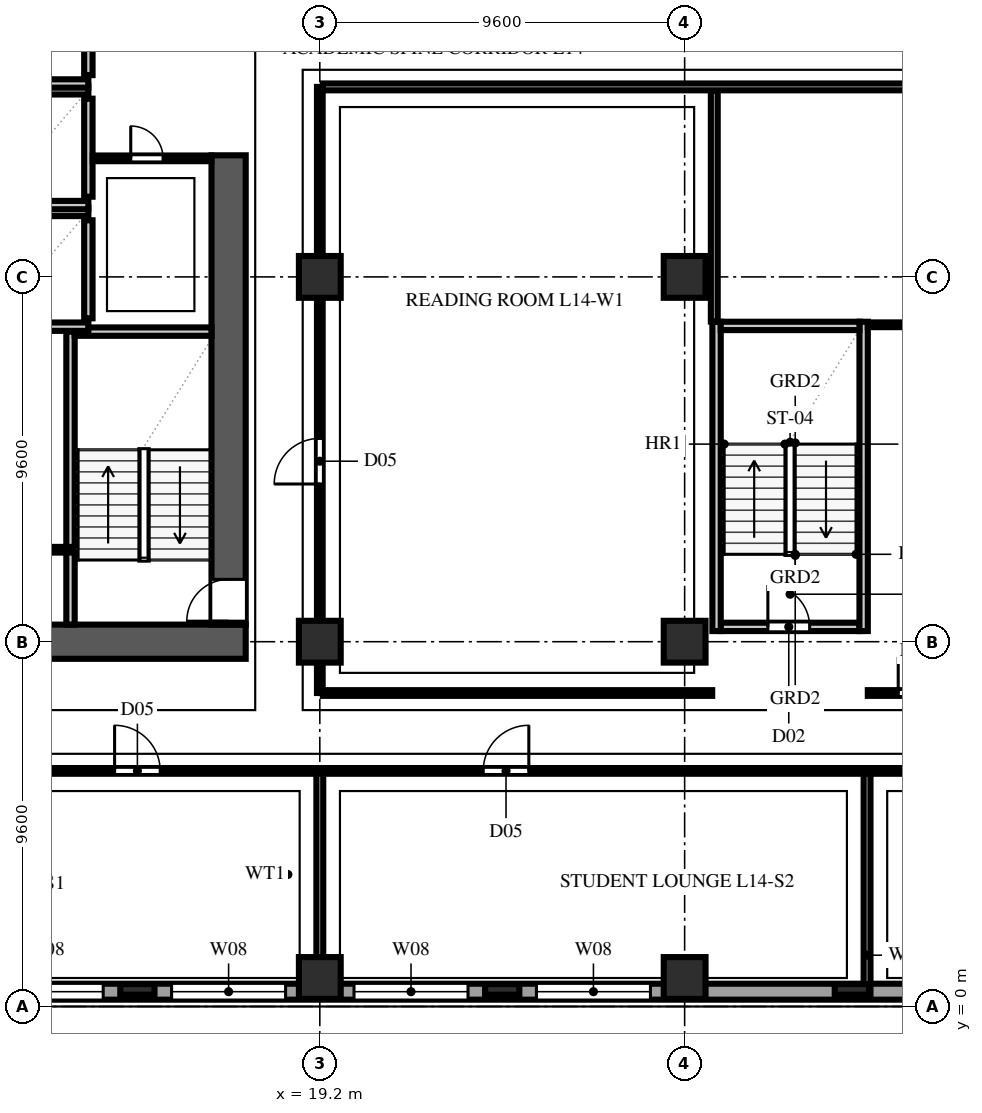
"""IFC4 building model, lengths in metres.
Left out: names, types, materials, properties, quantities, classifications, styles, units other than length and angle.
Written with IfcOpenShell. Run it as: python <this file> out.ifc"""

import sys

from ifc_helpers import new_model, si_unit, direction, frame, frame_2d, origin, origin_2d, place, context, subcontext, project, spatial, rectangle, extrude, element, fill, save


model = new_model("IFC4")
c1 = context("Model", 3, precision=1e-05, world=origin(), true_north=direction((0.0, 1.0)))
c2 = subcontext(c1, "Body", "Model", "MODEL_VIEW")
j1 = project(units=[si_unit("LENGTHUNIT", "METRE"), si_unit("PLANEANGLEUNIT", "RADIAN")], contexts=[c1])
p1 = place(None, origin())
s1 = spatial("IfcSite", under=j1, at=p1, CompositionType="ELEMENT")
p2 = place(p1, origin())
s2 = spatial("IfcBuilding", under=s1, at=p2, CompositionType="ELEMENT")
p3 = place(p2, frame((0.0, 0.0, 58.4)))
s3 = spatial("IfcBuildingStorey", under=s2, at=p3, CompositionType="ELEMENT", Elevation=58.4)
p4 = place(p3, frame((2.65, 9.6, 0.0), z_axis=(0.0, 0.0, 1.0), x_axis=(1.0, 0.0, 0.0)))
e1 = element("IfcWall", 1, at=p4, inside=s3, PredefinedType="SHEAR", context=c2, shape_type="SweptSolid", body=[
    extrude(rectangle(XDim=14.6, YDim=0.9, at=frame_2d((7.3, 0.0))), origin(), (0.0, 0.0, 1.0), 3.54),
])
p5 = place(p3, frame((16.8, 10.05, 0.0), z_axis=(0.0, 0.0, 1.0), x_axis=(0.0, 1.0, 0.0)))
e2 = element("IfcWall", 2, at=p5, inside=s3, PredefinedType="SHEAR", context=c2, shape_type="SweptSolid", body=[
    extrude(rectangle(XDim=12.35, YDim=0.9, at=frame_2d((6.175, 0.0))), origin(), (0.0, 0.0, 1.0), 3.54),
])
p6 = place(p5, frame((0.09, 0.0, 0.0)))
e3 = element("IfcOpeningElement", 3, at=p6, cuts=e2, PredefinedType="OPENING", context=c2, shape_type="SweptSolid", body=[
    extrude(rectangle(XDim=1.1, YDim=2.2, at=frame_2d((0.55, 1.1))), frame((0.0, 0.462, 0.0), z_axis=(0.0, -1.0, 0.0), x_axis=(1.0, 0.0, 0.0)), (0.0, 0.0, 1.0), 0.924),
])
for number, where, z_axis, x_axis in (
    (4, (19.2, 0.75, 0.0), (0.0, 0.0, 1.0), (1.0, 0.0, 0.0)),
    (5, (19.2, 9.6, 0.0), (0.0, 0.0, 1.0), (1.0, 0.0, 0.0)),
    (6, (19.2, 19.2, 0.0), (0.0, 0.0, 1.0), (1.0, 0.0, 0.0)),
    (7, (28.8, 0.75, 0.0), (0.0, 0.0, 1.0), (1.0, 0.0, 0.0)),
    (8, (28.8, 9.6, 0.0), (0.0, 0.0, 1.0), (1.0, 0.0, 0.0)),
    (9, (28.8, 19.2, 0.0), (0.0, 0.0, 1.0), (1.0, 0.0, 0.0)),
):
    element("IfcColumn", number, at=place(p3, frame(where, z_axis=z_axis, x_axis=x_axis)), inside=s3, PredefinedType="COLUMN", context=c2, shape_type="SweptSolid", body=[
        extrude(rectangle(XDim=1.1, YDim=1.1, at=origin_2d()), origin(), (0.0, 0.0, 1.0), 3.8),
    ])
for number, where, z_axis, x_axis in (
    (10, (14.4, 0.45, 0.0), (0.0, 0.0, 1.0), (1.0, 0.0, 0.0)),
    (11, (24.0, 0.45, 0.0), (0.0, 0.0, 1.0), (1.0, 0.0, 0.0)),
    (12, (33.2, 0.45, 0.0), (0.0, 0.0, 1.0), (1.0, 0.0, 0.0)),
):
    element("IfcColumn", number, at=place(p3, frame(where, z_axis=z_axis, x_axis=x_axis)), inside=s3, PredefinedType="PILASTER", context=c2, shape_type="SweptSolid", body=[
        extrude(rectangle(XDim=0.9, YDim=0.28, at=origin_2d()), origin(), (0.0, 0.0, 1.0), 3.8),
    ])
p7 = place(p3, frame((1.84, 0.39, 0.0), z_axis=(0.0, 0.0, 1.0), x_axis=(1.0, 0.0, 0.0)))
e13 = element("IfcWall", 13, at=p7, inside=s3, PredefinedType="SOLIDWALL", context=c2, shape_type="SweptSolid", body=[
    extrude(rectangle(XDim=63.52, YDim=0.42, at=frame_2d((31.76, 0.0))), origin(), (0.0, 0.0, 1.0), 3.54),
])
p8 = place(p7, frame((3.86, 0.0, 0.75)))
e14 = element("IfcOpeningElement", 14, at=p8, cuts=e13, PredefinedType="OPENING", context=c2, shape_type="SweptSolid", body=[
    extrude(rectangle(XDim=3.0, YDim=1.9, at=frame_2d((1.5, 0.95))), frame((0.0, 0.222, 0.0), z_axis=(0.0, -1.0, 0.0), x_axis=(1.0, 0.0, 0.0)), (0.0, 0.0, 1.0), 0.444),
])
p9 = place(p7, frame((8.66, 0.0, 0.75)))
e15 = element("IfcOpeningElement", 15, at=p9, cuts=e13, PredefinedType="OPENING", context=c2, shape_type="SweptSolid", body=[
    extrude(rectangle(XDim=3.0, YDim=1.9, at=frame_2d((1.5, 0.95))), frame((0.0, 0.222, 0.0), z_axis=(0.0, -1.0, 0.0), x_axis=(1.0, 0.0, 0.0)), (0.0, 0.0, 1.0), 0.444),
])
p10 = place(p7, frame((13.46, 0.0, 0.75)))
e16 = element("IfcOpeningElement", 16, at=p10, cuts=e13, PredefinedType="OPENING", context=c2, shape_type="SweptSolid", body=[
    extrude(rectangle(XDim=3.0, YDim=1.9, at=frame_2d((1.5, 0.95))), frame((0.0, 0.222, 0.0), z_axis=(0.0, -1.0, 0.0), x_axis=(1.0, 0.0, 0.0)), (0.0, 0.0, 1.0), 0.444),
])
p11 = place(p7, frame((18.26, 0.0, 0.75)))
e17 = element("IfcOpeningElement", 17, at=p11, cuts=e13, PredefinedType="OPENING", context=c2, shape_type="SweptSolid", body=[
    extrude(rectangle(XDim=3.0, YDim=1.9, at=frame_2d((1.5, 0.95))), frame((0.0, 0.222, 0.0), z_axis=(0.0, -1.0, 0.0), x_axis=(1.0, 0.0, 0.0)), (0.0, 0.0, 1.0), 0.444),
])
p12 = place(p7, frame((23.06, 0.0, 0.75)))
e18 = element("IfcOpeningElement", 18, at=p12, cuts=e13, PredefinedType="OPENING", context=c2, shape_type="SweptSolid", body=[
    extrude(rectangle(XDim=3.0, YDim=1.9, at=frame_2d((1.5, 0.95))), frame((0.0, 0.222, 0.0), z_axis=(0.0, -1.0, 0.0), x_axis=(1.0, 0.0, 0.0)), (0.0, 0.0, 1.0), 0.444),
])
p13 = place(p3, frame((12.64, 10.05, 0.0), z_axis=(0.0, 0.0, 1.0), x_axis=(0.0, 1.0, 0.0)))
e19 = element("IfcWall", 19, at=p13, inside=s3, PredefinedType="SOLIDWALL", context=c2, shape_type="SweptSolid", body=[
    extrude(rectangle(XDim=7.71, YDim=0.22, at=frame_2d((3.855, 0.0))), origin(), (0.0, 0.0, 1.0), 3.54),
])
p14 = place(p3, frame((12.75, 17.76, 0.0), z_axis=(0.0, 0.0, 1.0), x_axis=(1.0, 0.0, 0.0)))
e20 = element("IfcWall", 20, at=p14, inside=s3, PredefinedType="SOLIDWALL", context=c2, shape_type="SweptSolid", body=[
    extrude(rectangle(XDim=3.6, YDim=0.22, at=frame_2d((1.8, 0.0))), origin(), (0.0, 0.0, 1.0), 3.54),
])
p15 = place(p3, frame((29.75, 9.99, 0.0), z_axis=(0.0, 0.0, 1.0), x_axis=(1.0, 0.0, 0.0)))
e21 = element("IfcWall", 21, at=p15, inside=s3, PredefinedType="SOLIDWALL", context=c2, shape_type="SweptSolid", body=[
    extrude(rectangle(XDim=3.65, YDim=0.22, at=frame_2d((1.825, 0.0))), origin(), (0.0, 0.0, 1.0), 3.54),
])
p16 = place(p15, frame((1.24, 0.0, 0.0)))
e22 = element("IfcOpeningElement", 22, at=p16, cuts=e21, PredefinedType="OPENING", context=c2, shape_type="SweptSolid", body=[
    extrude(rectangle(XDim=1.1, YDim=2.2, at=frame_2d((0.55, 1.1))), frame((0.0, 0.122, 0.0), z_axis=(0.0, -1.0, 0.0), x_axis=(1.0, 0.0, 0.0)), (0.0, 0.0, 1.0), 0.244),
])
for number, where, z_axis, x_axis in (
    (23, (29.64, 9.88, 0.0), (0.0, 0.0, 1.0), (0.0, 1.0, 0.0)),
    (24, (33.51, 9.88, 0.0), (0.0, 0.0, 1.0), (0.0, 1.0, 0.0)),
):
    element("IfcWall", number, at=place(p3, frame(where, z_axis=z_axis, x_axis=x_axis)), inside=s3, PredefinedType="SOLIDWALL", context=c2, shape_type="SweptSolid", body=[
        extrude(rectangle(XDim=8.14, YDim=0.22, at=frame_2d((4.07, 0.0))), origin(), (0.0, 0.0, 1.0), 3.54),
    ])
p17 = place(p3, frame((29.75, 17.91, 0.0), z_axis=(0.0, 0.0, 1.0), x_axis=(1.0, 0.0, 0.0)))
e25 = element("IfcWall", 25, at=p17, inside=s3, PredefinedType="SOLIDWALL", context=c2, shape_type="SweptSolid", body=[
    extrude(rectangle(XDim=3.65, YDim=0.22, at=frame_2d((1.825, 0.0))), origin(), (0.0, 0.0, 1.0), 3.54),
])
p18 = place(p3, frame((13.11, 18.11, 0.0), z_axis=(0.0, 0.0, 1.0), x_axis=(0.0, 1.0, 0.0)))
e26 = element("IfcWall", 26, at=p18, inside=s3, PredefinedType="SOLIDWALL", context=c2, shape_type="SweptSolid", body=[
    extrude(rectangle(XDim=2.58, YDim=0.22, at=frame_2d((1.29, 0.0))), origin(), (0.0, 0.0, 1.0), 3.54),
])
for number, where, z_axis, x_axis in (
    (27, (10.49, 17.89, 0.0), (0.0, 0.0, 1.0), (1.0, 0.0, 0.0)),
    (28, (10.49, 20.91, 0.0), (0.0, 0.0, 1.0), (1.0, 0.0, 0.0)),
):
    element("IfcWall", number, at=place(p3, frame(where, z_axis=z_axis, x_axis=x_axis)), inside=s3, PredefinedType="SOLIDWALL", context=c2, shape_type="SweptSolid", body=[
        extrude(rectangle(XDim=2.62, YDim=0.22, at=frame_2d((1.31, 0.0))), origin(), (0.0, 0.0, 1.0), 3.54),
    ])
p19 = place(p3, frame((13.11, 21.31, 0.0), z_axis=(0.0, 0.0, 1.0), x_axis=(0.0, 1.0, 0.0)))
e29 = element("IfcWall", 29, at=p19, inside=s3, PredefinedType="SOLIDWALL", context=c2, shape_type="SweptSolid", body=[
    extrude(rectangle(XDim=2.58, YDim=0.22, at=frame_2d((1.29, 0.0))), origin(), (0.0, 0.0, 1.0), 3.54),
])
for number, where, z_axis, x_axis in (
    (30, (10.49, 21.09, 0.0), (0.0, 0.0, 1.0), (1.0, 0.0, 0.0)),
    (31, (10.49, 24.11, 0.0), (0.0, 0.0, 1.0), (1.0, 0.0, 0.0)),
):
    element("IfcWall", number, at=place(p3, frame(where, z_axis=z_axis, x_axis=x_axis)), inside=s3, PredefinedType="SOLIDWALL", context=c2, shape_type="SweptSolid", body=[
        extrude(rectangle(XDim=2.62, YDim=0.22, at=frame_2d((1.31, 0.0))), origin(), (0.0, 0.0, 1.0), 3.54),
    ])
p20 = place(p3, frame((13.11, 24.51, 0.0), z_axis=(0.0, 0.0, 1.0), x_axis=(0.0, 1.0, 0.0)))
e32 = element("IfcWall", 32, at=p20, inside=s3, PredefinedType="SOLIDWALL", context=c2, shape_type="SweptSolid", body=[
    extrude(rectangle(XDim=2.58, YDim=0.22, at=frame_2d((1.29, 0.0))), origin(), (0.0, 0.0, 1.0), 3.54),
])
p21 = place(p3, frame((10.49, 24.29, 0.0), z_axis=(0.0, 0.0, 1.0), x_axis=(1.0, 0.0, 0.0)))
e33 = element("IfcWall", 33, at=p21, inside=s3, PredefinedType="SOLIDWALL", context=c2, shape_type="SweptSolid", body=[
    extrude(rectangle(XDim=2.62, YDim=0.22, at=frame_2d((1.31, 0.0))), origin(), (0.0, 0.0, 1.0), 3.54),
])
p22 = place(p3, frame((10.55, 12.02, 0.0), z_axis=(0.0, 0.0, 1.0), x_axis=(1.0, 0.0, 0.0)))
e34 = element("IfcWall", 34, at=p22, inside=s3, PredefinedType="PARTITIONING", context=c2, shape_type="SweptSolid", body=[
    extrude(rectangle(XDim=2.08, YDim=0.15, at=frame_2d((1.04, 0.0))), origin(), (0.0, 0.0, 1.0), 3.54),
])
p23 = place(p22, frame((0.5, 0.0, 0.0)))
e35 = element("IfcOpeningElement", 35, at=p23, cuts=e34, PredefinedType="OPENING", context=c2, shape_type="SweptSolid", body=[
    extrude(rectangle(XDim=0.85, YDim=2.1, at=frame_2d((0.425, 1.05))), frame((0.0, 0.087, 0.0), z_axis=(0.0, -1.0, 0.0), x_axis=(1.0, 0.0, 0.0)), (0.0, 0.0, 1.0), 0.174),
])
p24 = place(p3, frame((13.225, 22.32, 0.0), z_axis=(0.0, 0.0, 1.0), x_axis=(1.0, 0.0, 0.0)))
e36 = element("IfcWall", 36, at=p24, inside=s3, PredefinedType="PARTITIONING", context=c2, shape_type="SweptSolid", body=[
    extrude(rectangle(XDim=3.12, YDim=0.15, at=frame_2d((1.56, 0.0))), origin(), (0.0, 0.0, 1.0), 3.54),
])
p25 = place(p24, frame((1.0, 0.0, 0.0)))
e37 = element("IfcOpeningElement", 37, at=p25, cuts=e36, PredefinedType="OPENING", context=c2, shape_type="SweptSolid", body=[
    extrude(rectangle(XDim=0.85, YDim=2.1, at=frame_2d((0.425, 1.05))), frame((0.0, 0.087, 0.0), z_axis=(0.0, -1.0, 0.0), x_axis=(1.0, 0.0, 0.0)), (0.0, 0.0, 1.0), 0.174),
])
p26 = place(p3, frame((19.2, 0.22, 0.0), z_axis=(0.0, 0.0, 1.0), x_axis=(0.0, 1.0, 0.0)))
e38 = element("IfcWall", 38, at=p26, inside=s3, PredefinedType="PARTITIONING", context=c2, shape_type="SweptSolid", body=[
    extrude(rectangle(XDim=0.53, YDim=0.18, at=frame_2d((0.265, 0.0))), origin(), (0.0, 0.0, 1.0), 3.54),
])
p27 = place(p3, frame((19.2, 0.75, 0.0), z_axis=(0.0, 0.0, 1.0), x_axis=(0.0, 1.0, 0.0)))
e39 = element("IfcWall", 39, at=p27, inside=s3, PredefinedType="PARTITIONING", context=c2, shape_type="SweptSolid", body=[
    extrude(rectangle(XDim=5.45, YDim=0.18, at=frame_2d((2.725, 0.0))), origin(), (0.0, 0.0, 1.0), 2.845),
])
p28 = place(p3, frame((33.6, 0.22, 0.0), z_axis=(0.0, 0.0, 1.0), x_axis=(0.0, 1.0, 0.0)))
e40 = element("IfcWall", 40, at=p28, inside=s3, PredefinedType="PARTITIONING", context=c2, shape_type="SweptSolid", body=[
    extrude(rectangle(XDim=5.98, YDim=0.18, at=frame_2d((2.99, 0.0))), origin(), (0.0, 0.0, 1.0), 3.54),
])
p29 = place(p3, frame((0.22, 6.2, 0.0), z_axis=(0.0, 0.0, 1.0), x_axis=(1.0, 0.0, 0.0)))
e41 = element("IfcWall", 41, at=p29, inside=s3, PredefinedType="PARTITIONING", context=c2, shape_type="SweptSolid", body=[
    extrude(rectangle(XDim=52.58, YDim=0.15, at=frame_2d((26.29, 0.0))), origin(), (0.0, 0.0, 1.0), 3.54),
])
p30 = place(p29, frame((13.58, 0.0, 0.0)))
e42 = element("IfcOpeningElement", 42, at=p30, cuts=e41, PredefinedType="OPENING", context=c2, shape_type="SweptSolid", body=[
    extrude(rectangle(XDim=1.2, YDim=2.2, at=frame_2d((0.6, 1.1))), frame((0.0, 0.087, 0.0), z_axis=(0.0, -1.0, 0.0), x_axis=(1.0, 0.0, 0.0)), (0.0, 0.0, 1.0), 0.174),
])
p31 = place(p29, frame((23.28, 0.0, 0.0)))
e43 = element("IfcOpeningElement", 43, at=p31, cuts=e41, PredefinedType="OPENING", context=c2, shape_type="SweptSolid", body=[
    extrude(rectangle(XDim=1.2, YDim=2.2, at=frame_2d((0.6, 1.1))), frame((0.0, 0.087, 0.0), z_axis=(0.0, -1.0, 0.0), x_axis=(1.0, 0.0, 0.0)), (0.0, 0.0, 1.0), 0.174),
])
p32 = place(p29, frame((41.18, 0.0, 0.0)))
e44 = element("IfcOpeningElement", 44, at=p32, cuts=e41, PredefinedType="OPENING", context=c2, shape_type="SweptSolid", body=[
    extrude(rectangle(XDim=2.0, YDim=2.3, at=frame_2d((1.0, 1.15))), frame((0.0, 0.087, 0.0), z_axis=(0.0, -1.0, 0.0), x_axis=(1.0, 0.0, 0.0)), (0.0, 0.0, 1.0), 0.174),
])
p33 = place(p3, frame((19.2, 8.25, 0.0), z_axis=(0.0, 0.0, 1.0), x_axis=(0.0, 1.0, 0.0)))
e45 = element("IfcWall", 45, at=p33, inside=s3, PredefinedType="PARTITIONING", context=c2, shape_type="SweptSolid", body=[
    extrude(rectangle(XDim=15.95, YDim=0.15, at=frame_2d((7.975, 0.0))), origin(), (0.0, 0.0, 1.0), 2.845),
])
p34 = place(p33, frame((5.5, 0.0, 0.0)))
e46 = element("IfcOpeningElement", 46, at=p34, cuts=e45, PredefinedType="OPENING", context=c2, shape_type="SweptSolid", body=[
    extrude(rectangle(XDim=1.2, YDim=2.2, at=frame_2d((0.6, 1.1))), frame((0.0, 0.087, 0.0), z_axis=(0.0, -1.0, 0.0), x_axis=(1.0, 0.0, 0.0)), (0.0, 0.0, 1.0), 0.174),
])
p35 = place(p3, frame((29.58, 18.025, 0.0), z_axis=(0.0, 0.0, 1.0), x_axis=(0.0, 1.0, 0.0)))
e47 = element("IfcWall", 47, at=p35, inside=s3, PredefinedType="PARTITIONING", context=c2, shape_type="SweptSolid", body=[
    extrude(rectangle(XDim=6.08, YDim=0.18, at=frame_2d((3.04, 0.0))), origin(), (0.0, 0.0, 1.0), 3.54),
])
p36 = place(p3, frame((19.28, 24.2, 0.0), z_axis=(0.0, 0.0, 1.0), x_axis=(1.0, 0.0, 0.0)))
e48 = element("IfcWall", 48, at=p36, inside=s3, PredefinedType="PARTITIONING", context=c2, shape_type="SweptSolid", body=[
    extrude(rectangle(XDim=31.47, YDim=0.18, at=frame_2d((15.735, 0.0))), origin(), (0.0, 0.0, 1.0), 3.54),
])
p37 = place(p36, frame((22.67, 0.0, 0.0)))
e49 = element("IfcOpeningElement", 49, at=p37, cuts=e48, PredefinedType="OPENING", context=c2, shape_type="SweptSolid", body=[
    extrude(rectangle(XDim=0.95, YDim=2.15, at=frame_2d((0.475, 1.075))), frame((0.0, 0.102, 0.0), z_axis=(0.0, -1.0, 0.0), x_axis=(1.0, 0.0, 0.0)), (0.0, 0.0, 1.0), 0.204),
])
p38 = place(p3, frame((19.28, 8.25, 0.0), z_axis=(0.0, 0.0, 1.0), x_axis=(1.0, 0.0, 0.0)))
e50 = element("IfcWall", 50, at=p38, inside=s3, PredefinedType="PARTITIONING", context=c2, shape_type="SweptSolid", body=[
    extrude(rectangle(XDim=10.245, YDim=0.15, at=frame_2d((5.123, 0.0))), origin(), (0.0, 0.0, 1.0), 3.54),
])
p39 = place(p3, frame((33.62, 17.94, 0.0), z_axis=(0.0, 0.0, 1.0), x_axis=(1.0, 0.0, 0.0)))
e51 = element("IfcWall", 51, at=p39, inside=s3, PredefinedType="PARTITIONING", context=c2, shape_type="SweptSolid", body=[
    extrude(rectangle(XDim=17.13, YDim=0.125, at=frame_2d((8.565, 0.0))), origin(), (0.0, 0.0, 1.0), 3.54),
])
p40 = place(p3, frame((33.62, 8.25, 0.0), z_axis=(0.0, 0.0, 1.0), x_axis=(1.0, 0.0, 0.0)))
e52 = element("IfcWall", 52, at=p40, inside=s3, PredefinedType="PARTITIONING", context=c2, shape_type="SweptSolid", body=[
    extrude(rectangle(XDim=17.13, YDim=0.15, at=frame_2d((8.565, 0.0))), origin(), (0.0, 0.0, 1.0), 3.54),
])
p41 = place(p40, frame((0.8, 0.0, 0.0)))
e53 = element("IfcOpeningElement", 53, at=p41, cuts=e52, PredefinedType="OPENING", context=c2, shape_type="SweptSolid", body=[
    extrude(rectangle(XDim=0.95, YDim=2.15, at=frame_2d((0.475, 1.075))), frame((0.0, 0.087, 0.0), z_axis=(0.0, -1.0, 0.0), x_axis=(1.0, 0.0, 0.0)), (0.0, 0.0, 1.0), 0.174),
])
p42 = place(p9, origin())
e54 = element("IfcWindow", 54, at=p42, inside=s3, PartitioningType="TRIPLE_PANEL_VERTICAL", PredefinedType="WINDOW", context=c2, shape_type="SweptSolid", body=[
    extrude(rectangle(XDim=3.0, YDim=1.9, at=frame_2d((1.5, 0.95))), frame((0.0, 0.11, 0.0), z_axis=(0.0, -1.0, 0.0), x_axis=(1.0, 0.0, 0.0)), (0.0, 0.0, 1.0), 0.06),
])
fill(e15, e54)
p43 = place(p10, origin())
e55 = element("IfcWindow", 55, at=p43, inside=s3, PartitioningType="TRIPLE_PANEL_VERTICAL", PredefinedType="WINDOW", context=c2, shape_type="SweptSolid", body=[
    extrude(rectangle(XDim=3.0, YDim=1.9, at=frame_2d((1.5, 0.95))), frame((0.0, 0.11, 0.0), z_axis=(0.0, -1.0, 0.0), x_axis=(1.0, 0.0, 0.0)), (0.0, 0.0, 1.0), 0.06),
])
fill(e16, e55)
p44 = place(p11, origin())
e56 = element("IfcWindow", 56, at=p44, inside=s3, PartitioningType="TRIPLE_PANEL_VERTICAL", PredefinedType="WINDOW", context=c2, shape_type="SweptSolid", body=[
    extrude(rectangle(XDim=3.0, YDim=1.9, at=frame_2d((1.5, 0.95))), frame((0.0, 0.11, 0.0), z_axis=(0.0, -1.0, 0.0), x_axis=(1.0, 0.0, 0.0)), (0.0, 0.0, 1.0), 0.06),
])
fill(e17, e56)
p45 = place(p12, origin())
e57 = element("IfcWindow", 57, at=p45, inside=s3, PartitioningType="TRIPLE_PANEL_VERTICAL", PredefinedType="WINDOW", context=c2, shape_type="SweptSolid", body=[
    extrude(rectangle(XDim=3.0, YDim=1.9, at=frame_2d((1.5, 0.95))), frame((0.0, 0.11, 0.0), z_axis=(0.0, -1.0, 0.0), x_axis=(1.0, 0.0, 0.0)), (0.0, 0.0, 1.0), 0.06),
])
fill(e18, e57)
p46 = place(p6, origin())
e58 = element("IfcDoor", 58, at=p46, inside=s3, OperationType="SINGLE_SWING_LEFT", PredefinedType="DOOR", context=c2, shape_type="SweptSolid", body=[
    extrude(rectangle(XDim=1.1, YDim=2.2, at=frame_2d((0.55, 1.1))), frame((0.0, 0.025, 0.0), z_axis=(0.0, -1.0, 0.0), x_axis=(1.0, 0.0, 0.0)), (0.0, 0.0, 1.0), 0.05),
])
fill(e3, e58)
p47 = place(p16, origin())
e59 = element("IfcDoor", 59, at=p47, inside=s3, OperationType="SINGLE_SWING_LEFT", PredefinedType="DOOR", context=c2, shape_type="SweptSolid", body=[
    extrude(rectangle(XDim=1.1, YDim=2.2, at=frame_2d((0.55, 1.1))), frame((0.0, 0.025, 0.0), z_axis=(0.0, -1.0, 0.0), x_axis=(1.0, 0.0, 0.0)), (0.0, 0.0, 1.0), 0.05),
])
fill(e22, e59)
p48 = place(p25, origin())
e60 = element("IfcDoor", 60, at=p48, inside=s3, OperationType="SINGLE_SWING_LEFT", PredefinedType="DOOR", context=c2, shape_type="SweptSolid", body=[
    extrude(rectangle(XDim=0.85, YDim=2.1, at=frame_2d((0.425, 1.05))), frame((0.0, 0.025, 0.0), z_axis=(0.0, -1.0, 0.0), x_axis=(1.0, 0.0, 0.0)), (0.0, 0.0, 1.0), 0.05),
])
fill(e37, e60)
p49 = place(p30, origin())
e61 = element("IfcDoor", 61, at=p49, inside=s3, OperationType="SINGLE_SWING_LEFT", PredefinedType="DOOR", context=c2, shape_type="SweptSolid", body=[
    extrude(rectangle(XDim=1.2, YDim=2.2, at=frame_2d((0.6, 1.1))), frame((0.0, 0.025, 0.0), z_axis=(0.0, -1.0, 0.0), x_axis=(1.0, 0.0, 0.0)), (0.0, 0.0, 1.0), 0.05),
])
fill(e42, e61)
p50 = place(p31, origin())
e62 = element("IfcDoor", 62, at=p50, inside=s3, OperationType="SINGLE_SWING_RIGHT", PredefinedType="DOOR", context=c2, shape_type="SweptSolid", body=[
    extrude(rectangle(XDim=1.2, YDim=2.2, at=frame_2d((0.6, 1.1))), frame((0.0, 0.025, 0.0), z_axis=(0.0, -1.0, 0.0), x_axis=(1.0, 0.0, 0.0)), (0.0, 0.0, 1.0), 0.05),
])
fill(e43, e62)
p51 = place(p34, origin())
e63 = element("IfcDoor", 63, at=p51, inside=s3, OperationType="SINGLE_SWING_LEFT", PredefinedType="DOOR", context=c2, shape_type="SweptSolid", body=[
    extrude(rectangle(XDim=1.2, YDim=2.2, at=frame_2d((0.6, 1.1))), frame((0.0, 0.025, 0.0), z_axis=(0.0, -1.0, 0.0), x_axis=(1.0, 0.0, 0.0)), (0.0, 0.0, 1.0), 0.05),
])
fill(e46, e63)
p52 = place(p41, origin())
e64 = element("IfcDoor", 64, at=p52, inside=s3, OperationType="SINGLE_SWING_LEFT", PredefinedType="DOOR", context=c2, shape_type="SweptSolid", body=[
    extrude(rectangle(XDim=0.95, YDim=2.15, at=frame_2d((0.475, 1.075))), frame((0.0, 0.025, 0.0), z_axis=(0.0, -1.0, 0.0), x_axis=(1.0, 0.0, 0.0)), (0.0, 0.0, 1.0), 0.05),
])
fill(e53, e64)
save(model, sys.argv[1])
